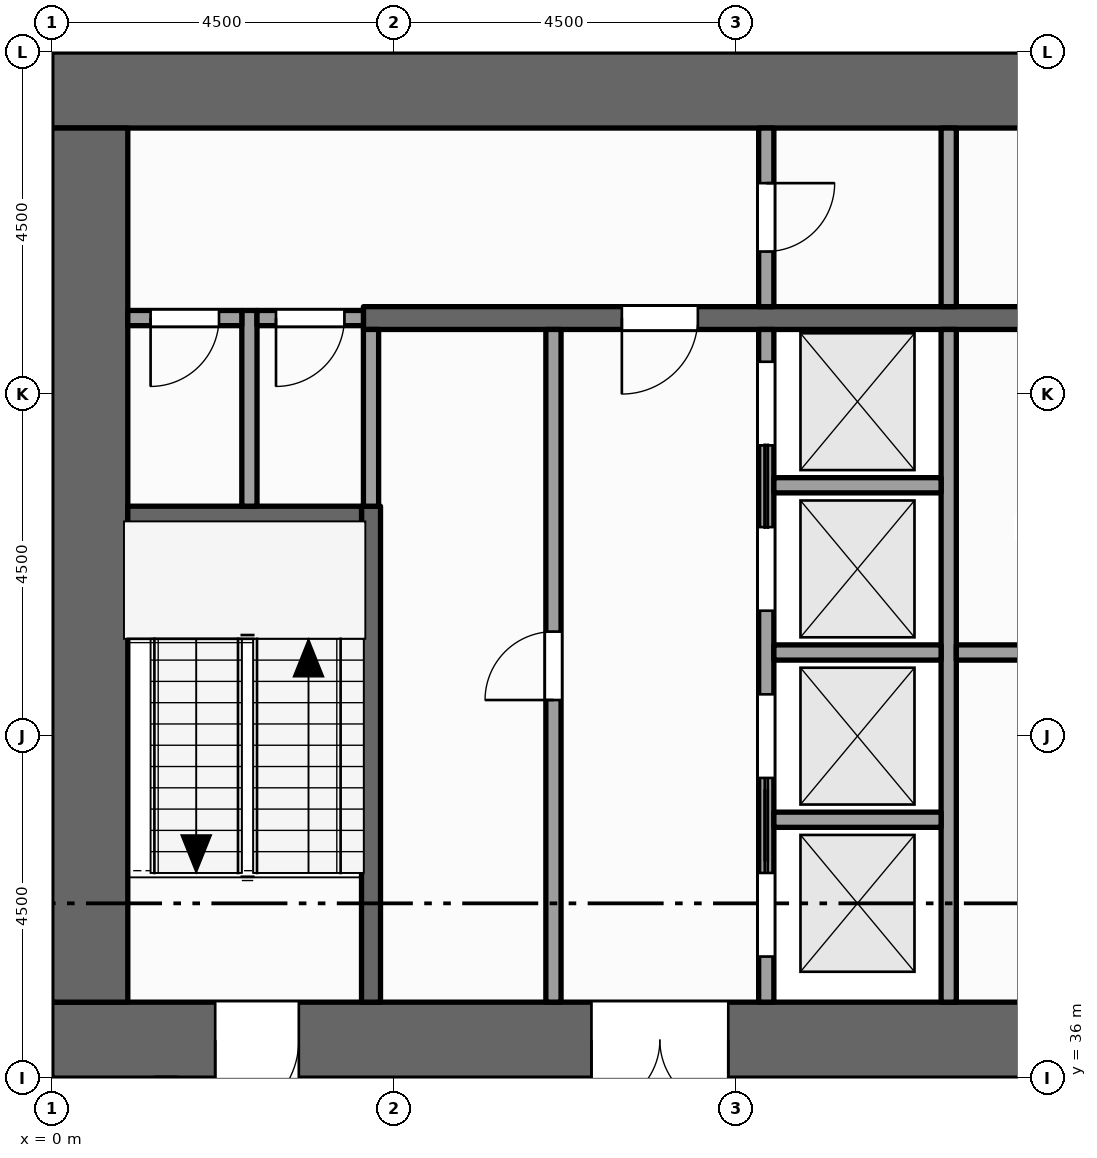
"""IFC4 building model, lengths in metres.
Left out: names, types, materials, properties, quantities, classifications, styles, units other than length and angle.
Written with IfcOpenShell. Run it as: python <this file> out.ifc"""

import sys

from ifc_helpers import new_model, si_unit, direction, frame, frame_2d, origin, place, context, subcontext, project, spatial, rectangle, extrude, element, fill, save


model = new_model("IFC4")
c1 = context("Model", 3, precision=1e-05, world=origin(), true_north=direction((0.0, 1.0)))
c2 = subcontext(c1, "Body", "Model", "MODEL_VIEW")
j1 = project(units=[si_unit("LENGTHUNIT", "METRE"), si_unit("PLANEANGLEUNIT", "RADIAN")], contexts=[c1])
p1 = place(None, origin())
s1 = spatial("IfcSite", under=j1, at=p1, CompositionType="ELEMENT")
p2 = place(p1, origin())
s2 = spatial("IfcBuilding", under=s1, at=p2, CompositionType="ELEMENT")
p3 = place(p2, frame((0.0, 0.0, 227.0)))
s3 = spatial("IfcBuildingStorey", under=s2, at=p3, CompositionType="ELEMENT", Elevation=227.0)
p4 = place(p3, frame((0.0, 36.5, -0.15), z_axis=(0.0, 0.0, 1.0), x_axis=(1.0, 0.0, 0.0)))
e1 = element("IfcWall", 1, at=p4, inside=s3, PredefinedType="SHEAR", context=c2, shape_type="SweptSolid", body=[
    extrude(rectangle(XDim=22.5, YDim=1.0, at=frame_2d((11.25, 0.0))), origin(), (0.0, 0.0, 1.0), 4.0),
])
p5 = place(p4, frame((7.1, 0.0, 0.15)))
e2 = element("IfcOpeningElement", 2, at=p5, cuts=e1, PredefinedType="OPENING", context=c2, shape_type="SweptSolid", body=[
    extrude(rectangle(XDim=1.8, YDim=2.1, at=frame_2d((0.9, 1.05))), frame((0.0, 0.51, 0.0), z_axis=(0.0, -1.0, 0.0), x_axis=(1.0, 0.0, 0.0)), (0.0, 0.0, 1.0), 1.02),
])
p6 = place(p4, frame((13.15, 0.0, 0.15)))
e3 = element("IfcOpeningElement", 3, at=p6, cuts=e1, PredefinedType="OPENING", context=c2, shape_type="SweptSolid", body=[
    extrude(rectangle(XDim=1.1, YDim=2.1, at=frame_2d((0.55, 1.05))), frame((0.0, 0.51, 0.0), z_axis=(0.0, -1.0, 0.0), x_axis=(1.0, 0.0, 0.0)), (0.0, 0.0, 1.0), 1.02),
])
p7 = place(p4, frame((2.15, 0.0, 0.15)))
e4 = element("IfcOpeningElement", 4, at=p7, cuts=e1, PredefinedType="OPENING", context=c2, shape_type="SweptSolid", body=[
    extrude(rectangle(XDim=1.1, YDim=2.1, at=frame_2d((0.55, 1.05))), frame((0.0, 0.51, 0.0), z_axis=(0.0, -1.0, 0.0), x_axis=(1.0, 0.0, 0.0)), (0.0, 0.0, 1.0), 1.02),
])
p8 = place(p4, frame((19.35, 0.0, 0.15)))
e5 = element("IfcOpeningElement", 5, at=p8, cuts=e1, PredefinedType="OPENING", context=c2, shape_type="SweptSolid", body=[
    extrude(rectangle(XDim=1.1, YDim=2.1, at=frame_2d((0.55, 1.05))), frame((0.0, 0.51, 0.0), z_axis=(0.0, -1.0, 0.0), x_axis=(1.0, 0.0, 0.0)), (0.0, 0.0, 1.0), 1.02),
])
p9 = place(p3, frame((0.0, 49.0, -0.15), z_axis=(0.0, 0.0, 1.0), x_axis=(1.0, 0.0, 0.0)))
e6 = element("IfcWall", 6, at=p9, inside=s3, PredefinedType="SHEAR", context=c2, shape_type="SweptSolid", body=[
    extrude(rectangle(XDim=22.5, YDim=1.0, at=frame_2d((11.25, 0.0))), origin(), (0.0, 0.0, 1.0), 4.0),
])
p10 = place(p3, frame((0.5, 37.0, -0.15), z_axis=(0.0, 0.0, 1.0), x_axis=(0.0, 1.0, 0.0)))
e7 = element("IfcWall", 7, at=p10, inside=s3, PredefinedType="SHEAR", context=c2, shape_type="SweptSolid", body=[
    extrude(rectangle(XDim=11.5, YDim=1.0, at=frame_2d((5.75, 0.0))), origin(), (0.0, 0.0, 1.0), 4.0),
])
p11 = place(p3, frame((2.6, 43.525, 0.0), z_axis=(0.0, 0.0, 1.0), x_axis=(0.0, 1.0, 0.0)))
e8 = element("IfcWall", 8, at=p11, inside=s3, PredefinedType="PARTITIONING", context=c2, shape_type="SweptSolid", body=[
    extrude(rectangle(XDim=2.575, YDim=0.2, at=frame_2d((1.288, 0.0))), origin(), (0.0, 0.0, 1.0), 3.85),
])
p12 = place(p3, frame((4.2, 37.0, 0.0), z_axis=(0.0, 0.0, 1.0), x_axis=(0.0, 1.0, 0.0)))
e9 = element("IfcWall", 9, at=p12, inside=s3, PredefinedType="SHEAR", context=c2, shape_type="SweptSolid", body=[
    extrude(rectangle(XDim=6.525, YDim=0.25, at=frame_2d((3.262, 0.0))), origin(), (0.0, 0.0, 1.0), 3.85),
])
p13 = place(p3, frame((4.2, 43.525, 0.0), z_axis=(0.0, 0.0, 1.0), x_axis=(0.0, 1.0, 0.0)))
e10 = element("IfcWall", 10, at=p13, inside=s3, PredefinedType="PARTITIONING", context=c2, shape_type="SweptSolid", body=[
    extrude(rectangle(XDim=2.325, YDim=0.2, at=frame_2d((1.163, 0.0))), origin(), (0.0, 0.0, 1.0), 3.85),
])
p14 = place(p3, frame((6.6, 37.0, 0.0), z_axis=(0.0, 0.0, 1.0), x_axis=(0.0, 1.0, 0.0)))
e11 = element("IfcWall", 11, at=p14, inside=s3, PredefinedType="PARTITIONING", context=c2, shape_type="SweptSolid", body=[
    extrude(rectangle(XDim=8.85, YDim=0.2, at=frame_2d((4.425, 0.0))), origin(), (0.0, 0.0, 1.0), 3.85),
])
p15 = place(p14, frame((3.975, 0.0, 0.0)))
e12 = element("IfcOpeningElement", 12, at=p15, cuts=e11, PredefinedType="OPENING", context=c2, shape_type="SweptSolid", body=[
    extrude(rectangle(XDim=0.9, YDim=2.1, at=frame_2d((0.45, 1.05))), frame((0.0, 0.11, 0.0), z_axis=(0.0, -1.0, 0.0), x_axis=(1.0, 0.0, 0.0)), (0.0, 0.0, 1.0), 0.22),
])
p16 = place(p3, frame((9.4, 37.0, 0.0), z_axis=(0.0, 0.0, 1.0), x_axis=(0.0, 1.0, 0.0)))
e13 = element("IfcWall", 13, at=p16, inside=s3, PredefinedType="SOLIDWALL", context=c2, shape_type="SweptSolid", body=[
    extrude(rectangle(XDim=8.85, YDim=0.2, at=frame_2d((4.425, 0.0))), origin(), (0.0, 0.0, 1.0), 3.85),
])
p17 = place(p16, frame((0.6, 0.0, 0.012)))
e14 = element("IfcOpeningElement", 14, at=p17, cuts=e13, PredefinedType="OPENING", context=c2, shape_type="SweptSolid", body=[
    extrude(rectangle(XDim=1.1, YDim=2.1, at=frame_2d((0.55, 1.05))), frame((0.0, 0.11, 0.0), z_axis=(0.0, -1.0, 0.0), x_axis=(1.0, 0.0, 0.0)), (0.0, 0.0, 1.0), 0.22),
])
p18 = place(p16, frame((2.95, 0.0, 0.012)))
e15 = element("IfcOpeningElement", 15, at=p18, cuts=e13, PredefinedType="OPENING", context=c2, shape_type="SweptSolid", body=[
    extrude(rectangle(XDim=1.1, YDim=2.1, at=frame_2d((0.55, 1.05))), frame((0.0, 0.11, 0.0), z_axis=(0.0, -1.0, 0.0), x_axis=(1.0, 0.0, 0.0)), (0.0, 0.0, 1.0), 0.22),
])
p19 = place(p16, frame((5.15, 0.0, 0.012)))
e16 = element("IfcOpeningElement", 16, at=p19, cuts=e13, PredefinedType="OPENING", context=c2, shape_type="SweptSolid", body=[
    extrude(rectangle(XDim=1.1, YDim=2.1, at=frame_2d((0.55, 1.05))), frame((0.0, 0.11, 0.0), z_axis=(0.0, -1.0, 0.0), x_axis=(1.0, 0.0, 0.0)), (0.0, 0.0, 1.0), 0.22),
])
p20 = place(p16, frame((7.325, 0.0, 0.012)))
e17 = element("IfcOpeningElement", 17, at=p20, cuts=e13, PredefinedType="OPENING", context=c2, shape_type="SweptSolid", body=[
    extrude(rectangle(XDim=1.1, YDim=2.1, at=frame_2d((0.55, 1.05))), frame((0.0, 0.11, 0.0), z_axis=(0.0, -1.0, 0.0), x_axis=(1.0, 0.0, 0.0)), (0.0, 0.0, 1.0), 0.22),
])
p21 = place(p3, frame((9.4, 46.15, 0.0), z_axis=(0.0, 0.0, 1.0), x_axis=(0.0, 1.0, 0.0)))
e18 = element("IfcWall", 18, at=p21, inside=s3, PredefinedType="PARTITIONING", context=c2, shape_type="SweptSolid", body=[
    extrude(rectangle(XDim=2.35, YDim=0.2, at=frame_2d((1.175, 0.0))), origin(), (0.0, 0.0, 1.0), 3.85),
])
p22 = place(p21, frame((0.725, 0.0, 0.0)))
e19 = element("IfcOpeningElement", 19, at=p22, cuts=e18, PredefinedType="OPENING", context=c2, shape_type="SweptSolid", body=[
    extrude(rectangle(XDim=0.9, YDim=2.1, at=frame_2d((0.45, 1.05))), frame((0.0, 0.11, 0.0), z_axis=(0.0, -1.0, 0.0), x_axis=(1.0, 0.0, 0.0)), (0.0, 0.0, 1.0), 0.22),
])
p23 = place(p3, frame((11.8, 37.0, 0.0), z_axis=(0.0, 0.0, 1.0), x_axis=(0.0, 1.0, 0.0)))
e20 = element("IfcWall", 20, at=p23, inside=s3, PredefinedType="SOLIDWALL", context=c2, shape_type="SweptSolid", body=[
    extrude(rectangle(XDim=8.85, YDim=0.2, at=frame_2d((4.425, 0.0))), origin(), (0.0, 0.0, 1.0), 3.85),
])
p24 = place(p3, frame((11.8, 46.15, 0.0), z_axis=(0.0, 0.0, 1.0), x_axis=(0.0, 1.0, 0.0)))
e21 = element("IfcWall", 21, at=p24, inside=s3, PredefinedType="PARTITIONING", context=c2, shape_type="SweptSolid", body=[
    extrude(rectangle(XDim=2.35, YDim=0.2, at=frame_2d((1.175, 0.0))), origin(), (0.0, 0.0, 1.0), 3.85),
])
for number, where, z_axis, x_axis in (
    (22, (9.5, 39.4, 0.0), (0.0, 0.0, 1.0), (1.0, 0.0, 0.0)),
    (23, (9.5, 41.6, 0.0), (0.0, 0.0, 1.0), (1.0, 0.0, 0.0)),
):
    element("IfcWall", number, at=place(p3, frame(where, z_axis=z_axis, x_axis=x_axis)), inside=s3, PredefinedType="SOLIDWALL", context=c2, shape_type="SweptSolid", body=[
        extrude(rectangle(XDim=2.2, YDim=0.2, at=frame_2d((1.1, 0.0))), origin(), (0.0, 0.0, 1.0), 3.85),
    ])
p25 = place(p3, frame((11.9, 41.6, 0.0), z_axis=(0.0, 0.0, 1.0), x_axis=(1.0, 0.0, 0.0)))
e24 = element("IfcWall", 24, at=p25, inside=s3, PredefinedType="PARTITIONING", context=c2, shape_type="SweptSolid", body=[
    extrude(rectangle(XDim=3.6, YDim=0.2, at=frame_2d((1.8, 0.0))), origin(), (0.0, 0.0, 1.0), 3.85),
])
p26 = place(p25, frame((1.3, 0.0, 0.0)))
e25 = element("IfcOpeningElement", 25, at=p26, cuts=e24, PredefinedType="OPENING", context=c2, shape_type="SweptSolid", body=[
    extrude(rectangle(XDim=1.0, YDim=2.1, at=frame_2d((0.5, 1.05))), frame((0.0, 0.11, 0.0), z_axis=(0.0, -1.0, 0.0), x_axis=(1.0, 0.0, 0.0)), (0.0, 0.0, 1.0), 0.22),
])
p27 = place(p3, frame((1.0, 43.4, 0.0), z_axis=(0.0, 0.0, 1.0), x_axis=(1.0, 0.0, 0.0)))
e26 = element("IfcWall", 26, at=p27, inside=s3, PredefinedType="SHEAR", context=c2, shape_type="SweptSolid", body=[
    extrude(rectangle(XDim=3.075, YDim=0.25, at=frame_2d((1.538, 0.0))), origin(), (0.0, 0.0, 1.0), 3.85),
])
p28 = place(p3, frame((9.5, 43.8, 0.0), z_axis=(0.0, 0.0, 1.0), x_axis=(1.0, 0.0, 0.0)))
e27 = element("IfcWall", 27, at=p28, inside=s3, PredefinedType="SOLIDWALL", context=c2, shape_type="SweptSolid", body=[
    extrude(rectangle(XDim=2.2, YDim=0.2, at=frame_2d((1.1, 0.0))), origin(), (0.0, 0.0, 1.0), 3.85),
])
p29 = place(p3, frame((1.0, 46.0, 0.0), z_axis=(0.0, 0.0, 1.0), x_axis=(1.0, 0.0, 0.0)))
e28 = element("IfcWall", 28, at=p29, inside=s3, PredefinedType="PARTITIONING", context=c2, shape_type="SweptSolid", body=[
    extrude(rectangle(XDim=1.5, YDim=0.2, at=frame_2d((0.75, 0.0))), origin(), (0.0, 0.0, 1.0), 3.85),
])
p30 = place(p29, frame((0.3, 0.0, 0.0)))
e29 = element("IfcOpeningElement", 29, at=p30, cuts=e28, PredefinedType="OPENING", context=c2, shape_type="SweptSolid", body=[
    extrude(rectangle(XDim=0.9, YDim=2.1, at=frame_2d((0.45, 1.05))), frame((0.0, 0.11, 0.0), z_axis=(0.0, -1.0, 0.0), x_axis=(1.0, 0.0, 0.0)), (0.0, 0.0, 1.0), 0.22),
])
p31 = place(p3, frame((2.7, 46.0, 0.0), z_axis=(0.0, 0.0, 1.0), x_axis=(1.0, 0.0, 0.0)))
e30 = element("IfcWall", 30, at=p31, inside=s3, PredefinedType="PARTITIONING", context=c2, shape_type="SweptSolid", body=[
    extrude(rectangle(XDim=1.4, YDim=0.2, at=frame_2d((0.7, 0.0))), origin(), (0.0, 0.0, 1.0), 3.85),
])
p32 = place(p31, frame((0.25, 0.0, 0.0)))
e31 = element("IfcOpeningElement", 31, at=p32, cuts=e30, PredefinedType="OPENING", context=c2, shape_type="SweptSolid", body=[
    extrude(rectangle(XDim=0.9, YDim=2.1, at=frame_2d((0.45, 1.05))), frame((0.0, 0.11, 0.0), z_axis=(0.0, -1.0, 0.0), x_axis=(1.0, 0.0, 0.0)), (0.0, 0.0, 1.0), 0.22),
])
p33 = place(p3, frame((4.1, 46.0, 0.0), z_axis=(0.0, 0.0, 1.0), x_axis=(1.0, 0.0, 0.0)))
e32 = element("IfcWall", 32, at=p33, inside=s3, PredefinedType="SHEAR", context=c2, shape_type="SweptSolid", body=[
    extrude(rectangle(XDim=14.5, YDim=0.3, at=frame_2d((7.25, 0.0))), origin(), (0.0, 0.0, 1.0), 3.85),
])
p34 = place(p33, frame((3.4, 0.0, 0.0)))
e33 = element("IfcOpeningElement", 33, at=p34, cuts=e32, PredefinedType="OPENING", context=c2, shape_type="SweptSolid", body=[
    extrude(rectangle(XDim=1.0, YDim=2.1, at=frame_2d((0.5, 1.05))), frame((0.0, 0.16, 0.0), z_axis=(0.0, -1.0, 0.0), x_axis=(1.0, 0.0, 0.0)), (0.0, 0.0, 1.0), 0.32),
])
p35 = place(p33, frame((9.1, 0.0, 0.0)))
e34 = element("IfcOpeningElement", 34, at=p35, cuts=e32, PredefinedType="OPENING", context=c2, shape_type="SweptSolid", body=[
    extrude(rectangle(XDim=1.0, YDim=2.1, at=frame_2d((0.5, 1.05))), frame((0.0, 0.16, 0.0), z_axis=(0.0, -1.0, 0.0), x_axis=(1.0, 0.0, 0.0)), (0.0, 0.0, 1.0), 0.32),
])
p36 = place(p17, origin())
e35 = element("IfcDoor", 35, at=p36, inside=s3, OperationType="SLIDING_TO_RIGHT", PredefinedType="DOOR", context=c2, shape_type="SweptSolid", body=[
    extrude(rectangle(XDim=1.1, YDim=2.1, at=frame_2d((0.55, 1.05))), frame((0.0, 0.025, 0.0), z_axis=(0.0, -1.0, 0.0), x_axis=(1.0, 0.0, 0.0)), (0.0, 0.0, 1.0), 0.05),
])
fill(e14, e35)
p37 = place(p18, origin())
e36 = element("IfcDoor", 36, at=p37, inside=s3, OperationType="SLIDING_TO_LEFT", PredefinedType="DOOR", context=c2, shape_type="SweptSolid", body=[
    extrude(rectangle(XDim=1.1, YDim=2.1, at=frame_2d((0.55, 1.05))), frame((0.0, 0.025, 0.0), z_axis=(0.0, -1.0, 0.0), x_axis=(1.0, 0.0, 0.0)), (0.0, 0.0, 1.0), 0.05),
])
fill(e15, e36)
p38 = place(p19, origin())
e37 = element("IfcDoor", 37, at=p38, inside=s3, OperationType="SLIDING_TO_RIGHT", PredefinedType="DOOR", context=c2, shape_type="SweptSolid", body=[
    extrude(rectangle(XDim=1.1, YDim=2.1, at=frame_2d((0.55, 1.05))), frame((0.0, 0.025, 0.0), z_axis=(0.0, -1.0, 0.0), x_axis=(1.0, 0.0, 0.0)), (0.0, 0.0, 1.0), 0.05),
])
fill(e16, e37)
p39 = place(p20, origin())
e38 = element("IfcDoor", 38, at=p39, inside=s3, OperationType="SLIDING_TO_LEFT", PredefinedType="DOOR", context=c2, shape_type="SweptSolid", body=[
    extrude(rectangle(XDim=1.1, YDim=2.1, at=frame_2d((0.55, 1.05))), frame((0.0, 0.025, 0.0), z_axis=(0.0, -1.0, 0.0), x_axis=(1.0, 0.0, 0.0)), (0.0, 0.0, 1.0), 0.05),
])
fill(e17, e38)
p40 = place(p5, origin())
e39 = element("IfcDoor", 39, at=p40, inside=s3, OperationType="DOUBLE_DOOR_SINGLE_SWING", PredefinedType="DOOR", context=c2, shape_type="SweptSolid", body=[
    extrude(rectangle(XDim=1.8, YDim=2.1, at=frame_2d((0.9, 1.05))), frame((0.0, 0.025, 0.0), z_axis=(0.0, -1.0, 0.0), x_axis=(1.0, 0.0, 0.0)), (0.0, 0.0, 1.0), 0.05),
])
fill(e2, e39)
p41 = place(p34, origin())
e40 = element("IfcDoor", 40, at=p41, inside=s3, OperationType="SINGLE_SWING_LEFT", PredefinedType="DOOR", context=c2, shape_type="SweptSolid", body=[
    extrude(rectangle(XDim=1.0, YDim=2.1, at=frame_2d((0.5, 1.05))), frame((0.0, 0.025, 0.0), z_axis=(0.0, -1.0, 0.0), x_axis=(1.0, 0.0, 0.0)), (0.0, 0.0, 1.0), 0.05),
])
fill(e33, e40)
p42 = place(p22, origin())
e41 = element("IfcDoor", 41, at=p42, inside=s3, OperationType="SINGLE_SWING_RIGHT", PredefinedType="DOOR", context=c2, shape_type="SweptSolid", body=[
    extrude(rectangle(XDim=0.9, YDim=2.1, at=frame_2d((0.45, 1.05))), frame((0.0, 0.025, 0.0), z_axis=(0.0, -1.0, 0.0), x_axis=(1.0, 0.0, 0.0)), (0.0, 0.0, 1.0), 0.05),
])
fill(e19, e41)
p43 = place(p7, origin())
e42 = element("IfcDoor", 42, at=p43, inside=s3, OperationType="SINGLE_SWING_LEFT", PredefinedType="DOOR", context=c2, shape_type="SweptSolid", body=[
    extrude(rectangle(XDim=1.1, YDim=2.1, at=frame_2d((0.55, 1.05))), frame((0.0, 0.025, 0.0), z_axis=(0.0, -1.0, 0.0), x_axis=(1.0, 0.0, 0.0)), (0.0, 0.0, 1.0), 0.05),
])
fill(e4, e42)
p44 = place(p30, origin())
e43 = element("IfcDoor", 43, at=p44, inside=s3, OperationType="SINGLE_SWING_LEFT", PredefinedType="DOOR", context=c2, shape_type="SweptSolid", body=[
    extrude(rectangle(XDim=0.9, YDim=2.1, at=frame_2d((0.45, 1.05))), frame((0.0, 0.025, 0.0), z_axis=(0.0, -1.0, 0.0), x_axis=(1.0, 0.0, 0.0)), (0.0, 0.0, 1.0), 0.05),
])
fill(e29, e43)
p45 = place(p32, origin())
e44 = element("IfcDoor", 44, at=p45, inside=s3, OperationType="SINGLE_SWING_LEFT", PredefinedType="DOOR", context=c2, shape_type="SweptSolid", body=[
    extrude(rectangle(XDim=0.9, YDim=2.1, at=frame_2d((0.45, 1.05))), frame((0.0, 0.025, 0.0), z_axis=(0.0, -1.0, 0.0), x_axis=(1.0, 0.0, 0.0)), (0.0, 0.0, 1.0), 0.05),
])
fill(e31, e44)
p46 = place(p15, origin())
e45 = element("IfcDoor", 45, at=p46, inside=s3, OperationType="SINGLE_SWING_LEFT", PredefinedType="DOOR", context=c2, shape_type="SweptSolid", body=[
    extrude(rectangle(XDim=0.9, YDim=2.1, at=frame_2d((0.45, 1.05))), frame((0.0, 0.025, 0.0), z_axis=(0.0, -1.0, 0.0), x_axis=(1.0, 0.0, 0.0)), (0.0, 0.0, 1.0), 0.05),
])
fill(e12, e45)
save(model, sys.argv[1])
